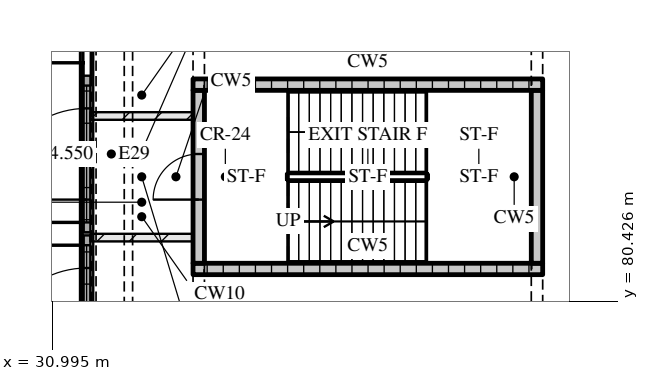
"""IFC4 building model, lengths in metres.
Left out: names, types, materials, properties, quantities, classifications, styles, units other than length and angle.
Written with IfcOpenShell. Run it as: python <this file> out.ifc"""

import sys

from ifc_helpers import new_model, si_unit, direction, frame, frame_2d, origin, place, context, subcontext, project, spatial, rectangle, extrude, element, fill, save


model = new_model("IFC4")
c1 = context("Model", 3, precision=1e-05, world=origin(), true_north=direction((0.0, 1.0)))
c2 = subcontext(c1, "Body", "Model", "MODEL_VIEW")
j1 = project(units=[si_unit("LENGTHUNIT", "METRE"), si_unit("PLANEANGLEUNIT", "RADIAN")], contexts=[c1])
p1 = place(None, origin())
s1 = spatial("IfcSite", under=j1, at=p1, CompositionType="ELEMENT")
p2 = place(p1, origin())
s2 = spatial("IfcBuilding", under=s1, at=p2, CompositionType="ELEMENT")
p3 = place(p2, origin())
s3 = spatial("IfcBuildingStorey", under=s2, at=p3, CompositionType="ELEMENT", Elevation=0.0)
p4 = place(p3, frame((31.9, 78.04, 0.0), z_axis=(0.0, 0.0, 1.0), x_axis=(0.0, 1.0, 0.0)))
e1 = element("IfcWall", 1, at=p4, inside=s3, PredefinedType="SOLIDWALL", context=c2, shape_type="SweptSolid", body=[
    extrude(rectangle(XDim=4.12, YDim=0.2, at=frame_2d((2.06, 0.0))), origin(), (0.0, 0.0, 1.0), 8.7),
])
p5 = place(p4, frame((0.86, 0.0, 0.0)))
e2 = element("IfcOpeningElement", 2, at=p5, cuts=e1, PredefinedType="OPENING", context=c2, shape_type="SweptSolid", body=[
    extrude(rectangle(XDim=2.4, YDim=2.4, at=frame_2d((1.2, 1.2))), frame((0.0, 0.11, 0.0), z_axis=(0.0, -1.0, 0.0), x_axis=(1.0, 0.0, 0.0)), (0.0, 0.0, 1.0), 0.22),
])
p6 = place(p4, frame((0.26, 0.0, 2.7)))
e3 = element("IfcOpeningElement", 3, at=p6, cuts=e1, PredefinedType="OPENING", context=c2, shape_type="SweptSolid", body=[
    extrude(rectangle(XDim=3.6, YDim=5.6, at=frame_2d((1.8, 2.8))), frame((0.0, 0.11, 0.0), z_axis=(0.0, -1.0, 0.0), x_axis=(1.0, 0.0, 0.0)), (0.0, 0.0, 1.0), 0.22),
])
p7 = place(p3, frame((31.9, 82.24, 0.0), z_axis=(0.0, 0.0, 1.0), x_axis=(0.0, 1.0, 0.0)))
e4 = element("IfcWall", 4, at=p7, inside=s3, PredefinedType="SOLIDWALL", context=c2, shape_type="SweptSolid", body=[
    extrude(rectangle(XDim=4.12, YDim=0.2, at=frame_2d((2.06, 0.0))), origin(), (0.0, 0.0, 1.0), 8.7),
])
p8 = place(p7, frame((0.86, 0.0, 0.0)))
e5 = element("IfcOpeningElement", 5, at=p8, cuts=e4, PredefinedType="OPENING", context=c2, shape_type="SweptSolid", body=[
    extrude(rectangle(XDim=2.4, YDim=2.4, at=frame_2d((1.2, 1.2))), frame((0.0, 0.11, 0.0), z_axis=(0.0, -1.0, 0.0), x_axis=(1.0, 0.0, 0.0)), (0.0, 0.0, 1.0), 0.22),
])
p9 = place(p7, frame((0.26, 0.0, 2.7)))
e6 = element("IfcOpeningElement", 6, at=p9, cuts=e4, PredefinedType="OPENING", context=c2, shape_type="SweptSolid", body=[
    extrude(rectangle(XDim=3.6, YDim=5.6, at=frame_2d((1.8, 2.8))), frame((0.0, 0.11, 0.0), z_axis=(0.0, -1.0, 0.0), x_axis=(1.0, 0.0, 0.0)), (0.0, 0.0, 1.0), 0.22),
])
p10 = place(p3, frame((34.7, 81.275, 0.0), z_axis=(0.0, 0.0, 1.0), x_axis=(1.0, 0.0, 0.0)))
e7 = element("IfcWall", 7, at=p10, inside=s3, PredefinedType="SOLIDWALL", context=c2, shape_type="SweptSolid", body=[
    extrude(rectangle(XDim=9.2, YDim=0.3, at=frame_2d((4.6, 0.0))), origin(), (0.0, 0.0, 1.0), 8.7),
])
p11 = place(p3, frame((34.85, 81.425, 0.0), z_axis=(0.0, 0.0, 1.0), x_axis=(0.0, 1.0, 0.0)))
e8 = element("IfcWall", 8, at=p11, inside=s3, PredefinedType="SOLIDWALL", context=c2, shape_type="SweptSolid", body=[
    extrude(rectangle(XDim=4.55, YDim=0.3, at=frame_2d((2.275, 0.0))), origin(), (0.0, 0.0, 1.0), 8.7),
])
p12 = place(p11, frame((1.675, 0.0, 0.0)))
e9 = element("IfcOpeningElement", 9, at=p12, cuts=e8, PredefinedType="OPENING", context=c2, shape_type="SweptSolid", body=[
    extrude(rectangle(XDim=1.2, YDim=2.1, at=frame_2d((0.6, 1.05))), frame((0.0, 0.16, 0.0), z_axis=(0.0, -1.0, 0.0), x_axis=(1.0, 0.0, 0.0)), (0.0, 0.0, 1.0), 0.32),
])
p13 = place(p3, frame((43.75, 81.425, 0.0), z_axis=(0.0, 0.0, 1.0), x_axis=(0.0, 1.0, 0.0)))
e10 = element("IfcWall", 10, at=p13, inside=s3, PredefinedType="SOLIDWALL", context=c2, shape_type="SweptSolid", body=[
    extrude(rectangle(XDim=4.55, YDim=0.3, at=frame_2d((2.275, 0.0))), origin(), (0.0, 0.0, 1.0), 8.7),
])
p14 = place(p3, frame((34.7, 86.125, 0.0), z_axis=(0.0, 0.0, 1.0), x_axis=(1.0, 0.0, 0.0)))
e11 = element("IfcWall", 11, at=p14, inside=s3, PredefinedType="SOLIDWALL", context=c2, shape_type="SweptSolid", body=[
    extrude(rectangle(XDim=9.2, YDim=0.3, at=frame_2d((4.6, 0.0))), origin(), (0.0, 0.0, 1.0), 8.7),
])
for number, where, z_axis, x_axis in (
    (12, (32.0, 82.1, 0.0), (0.0, 0.0, 1.0), (1.0, 0.0, 0.0)),
    (13, (32.0, 85.3, 0.0), (0.0, 0.0, 1.0), (1.0, 0.0, 0.0)),
):
    element("IfcWall", number, at=place(p3, frame(where, z_axis=z_axis, x_axis=x_axis)), inside=s3, PredefinedType="PARTITIONING", context=c2, shape_type="SweptSolid", body=[
        extrude(rectangle(XDim=2.7, YDim=0.2, at=frame_2d((1.35, 0.0))), origin(), (0.0, 0.0, 1.0), 8.7),
    ])
p15 = place(p5, origin())
e14 = element("IfcDoor", 14, at=p15, inside=s3, OperationType="DOUBLE_DOOR_SINGLE_SWING", PredefinedType="DOOR", context=c2, shape_type="SweptSolid", body=[
    extrude(rectangle(XDim=2.4, YDim=2.4, at=frame_2d((1.2, 1.2))), frame((0.0, 0.025, 0.0), z_axis=(0.0, -1.0, 0.0), x_axis=(1.0, 0.0, 0.0)), (0.0, 0.0, 1.0), 0.05),
])
fill(e2, e14)
p16 = place(p6, origin())
e15 = element("IfcWindow", 15, at=p16, inside=s3, PartitioningType="SINGLE_PANEL", PredefinedType="WINDOW", context=c2, shape_type="SweptSolid", body=[
    extrude(rectangle(XDim=3.6, YDim=5.6, at=frame_2d((1.8, 2.8))), frame((0.0, 0.03, 0.0), z_axis=(0.0, -1.0, 0.0), x_axis=(1.0, 0.0, 0.0)), (0.0, 0.0, 1.0), 0.06),
])
fill(e3, e15)
p17 = place(p8, origin())
e16 = element("IfcDoor", 16, at=p17, inside=s3, OperationType="DOUBLE_DOOR_SINGLE_SWING", PredefinedType="DOOR", context=c2, shape_type="SweptSolid", body=[
    extrude(rectangle(XDim=2.4, YDim=2.4, at=frame_2d((1.2, 1.2))), frame((0.0, 0.025, 0.0), z_axis=(0.0, -1.0, 0.0), x_axis=(1.0, 0.0, 0.0)), (0.0, 0.0, 1.0), 0.05),
])
fill(e5, e16)
p18 = place(p9, origin())
e17 = element("IfcWindow", 17, at=p18, inside=s3, PartitioningType="SINGLE_PANEL", PredefinedType="WINDOW", context=c2, shape_type="SweptSolid", body=[
    extrude(rectangle(XDim=3.6, YDim=5.6, at=frame_2d((1.8, 2.8))), frame((0.0, 0.03, 0.0), z_axis=(0.0, -1.0, 0.0), x_axis=(1.0, 0.0, 0.0)), (0.0, 0.0, 1.0), 0.06),
])
fill(e6, e17)
p19 = place(p12, origin())
e18 = element("IfcDoor", 18, at=p19, inside=s3, OperationType="SINGLE_SWING_LEFT", PredefinedType="DOOR", context=c2, shape_type="SweptSolid", body=[
    extrude(rectangle(XDim=1.2, YDim=2.1, at=frame_2d((0.6, 1.05))), frame((0.0, 0.025, 0.0), z_axis=(0.0, -1.0, 0.0), x_axis=(1.0, 0.0, 0.0)), (0.0, 0.0, 1.0), 0.05),
])
fill(e9, e18)
save(model, sys.argv[1])
